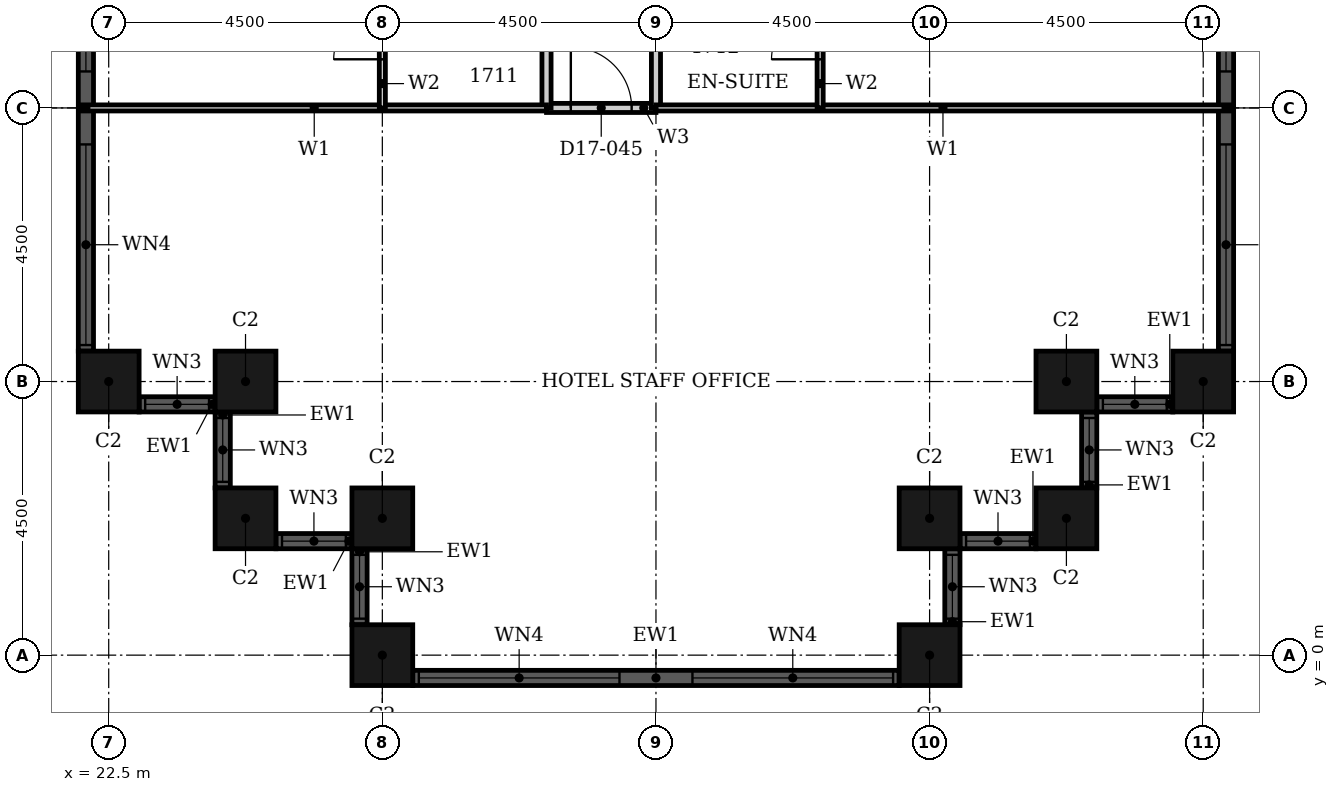
"""IFC4 building model, lengths in metres.
Left out: names, types, materials, properties, quantities, classifications, styles, units other than length and angle.
Written with IfcOpenShell. Run it as: python <this file> out.ifc"""

import sys

from ifc_helpers import new_model, si_unit, direction, frame, frame_2d, origin, origin_2d, place, context, subcontext, project, spatial, rectangle, hollow_rectangle, extrude, element, fill, save


model = new_model("IFC4")
c1 = context("Model", 3, precision=1e-05, world=origin(), true_north=direction((0.0, 1.0)))
c2 = subcontext(c1, "Body", "Model", "MODEL_VIEW")
j1 = project(units=[si_unit("LENGTHUNIT", "METRE"), si_unit("PLANEANGLEUNIT", "RADIAN")], contexts=[c1])
p1 = place(None, origin())
s1 = spatial("IfcSite", under=j1, at=p1, CompositionType="ELEMENT")
p2 = place(p1, origin())
s2 = spatial("IfcBuilding", under=s1, at=p2, CompositionType="ELEMENT")
p3 = place(p2, frame((0.0, 0.0, 74.4)))
s3 = spatial("IfcBuildingStorey", under=s2, at=p3, CompositionType="ELEMENT", Elevation=74.4)
for number, where, z_axis, x_axis in (
    (1, (22.5, 4.5, 0.0), (0.0, 0.0, 1.0), (1.0, 0.0, 0.0)),
    (2, (24.75, 4.5, 0.0), (0.0, 0.0, 1.0), (1.0, 0.0, 0.0)),
    (3, (24.75, 2.25, 0.0), (0.0, 0.0, 1.0), (1.0, 0.0, 0.0)),
    (4, (27.0, 2.25, 0.0), (0.0, 0.0, 1.0), (1.0, 0.0, 0.0)),
    (5, (27.0, 0.0, 0.0), (0.0, 0.0, 1.0), (1.0, 0.0, 0.0)),
    (6, (36.0, 0.0, 0.0), (0.0, 0.0, 1.0), (1.0, 0.0, 0.0)),
    (7, (36.0, 2.25, 0.0), (0.0, 0.0, 1.0), (1.0, 0.0, 0.0)),
    (8, (38.25, 2.25, 0.0), (0.0, 0.0, 1.0), (1.0, 0.0, 0.0)),
    (9, (38.25, 4.5, 0.0), (0.0, 0.0, 1.0), (1.0, 0.0, 0.0)),
    (10, (40.5, 4.5, 0.0), (0.0, 0.0, 1.0), (1.0, 0.0, 0.0)),
):
    element("IfcColumn", number, at=place(p3, frame(where, z_axis=z_axis, x_axis=x_axis)), inside=s3, PredefinedType="COLUMN", context=c2, shape_type="SweptSolid", body=[
        extrude(hollow_rectangle(XDim=1.0, YDim=1.0, WallThickness=0.032, at=origin_2d()), origin(), (0.0, 0.0, 1.0), 3.6),
    ])
p4 = place(p3, frame((23.0, 4.125, 0.0), z_axis=(0.0, 0.0, 1.0), x_axis=(1.0, 0.0, 0.0)))
e11 = element("IfcWall", 11, at=p4, inside=s3, PredefinedType="SOLIDWALL", context=c2, shape_type="SweptSolid", body=[
    extrude(rectangle(XDim=1.25, YDim=0.25, at=frame_2d((0.625, 0.0))), origin(), (0.0, 0.0, 1.0), 3.6),
])
p5 = place(p4, frame((0.1, 0.0, 0.9)))
e12 = element("IfcOpeningElement", 12, at=p5, cuts=e11, PredefinedType="OPENING", context=c2, shape_type="SweptSolid", body=[
    extrude(rectangle(XDim=1.05, YDim=2.08, at=frame_2d((0.525, 1.04))), frame((0.0, 0.135, 0.0), z_axis=(0.0, -1.0, 0.0), x_axis=(1.0, 0.0, 0.0)), (0.0, 0.0, 1.0), 0.27),
])
p6 = place(p3, frame((24.375, 4.0, 0.0), z_axis=(0.0, 0.0, 1.0), x_axis=(0.0, -1.0, 0.0)))
e13 = element("IfcWall", 13, at=p6, inside=s3, PredefinedType="SOLIDWALL", context=c2, shape_type="SweptSolid", body=[
    extrude(rectangle(XDim=1.25, YDim=0.25, at=frame_2d((0.625, 0.0))), origin(), (0.0, 0.0, 1.0), 3.6),
])
p7 = place(p6, frame((0.1, 0.0, 0.9)))
e14 = element("IfcOpeningElement", 14, at=p7, cuts=e13, PredefinedType="OPENING", context=c2, shape_type="SweptSolid", body=[
    extrude(rectangle(XDim=1.05, YDim=2.08, at=frame_2d((0.525, 1.04))), frame((0.0, 0.135, 0.0), z_axis=(0.0, -1.0, 0.0), x_axis=(1.0, 0.0, 0.0)), (0.0, 0.0, 1.0), 0.27),
])
p8 = place(p3, frame((25.25, 1.875, 0.0), z_axis=(0.0, 0.0, 1.0), x_axis=(1.0, 0.0, 0.0)))
e15 = element("IfcWall", 15, at=p8, inside=s3, PredefinedType="SOLIDWALL", context=c2, shape_type="SweptSolid", body=[
    extrude(rectangle(XDim=1.25, YDim=0.25, at=frame_2d((0.625, 0.0))), origin(), (0.0, 0.0, 1.0), 3.6),
])
p9 = place(p8, frame((0.1, 0.0, 0.9)))
e16 = element("IfcOpeningElement", 16, at=p9, cuts=e15, PredefinedType="OPENING", context=c2, shape_type="SweptSolid", body=[
    extrude(rectangle(XDim=1.05, YDim=2.08, at=frame_2d((0.525, 1.04))), frame((0.0, 0.135, 0.0), z_axis=(0.0, -1.0, 0.0), x_axis=(1.0, 0.0, 0.0)), (0.0, 0.0, 1.0), 0.27),
])
p10 = place(p3, frame((26.625, 1.75, 0.0), z_axis=(0.0, 0.0, 1.0), x_axis=(0.0, -1.0, 0.0)))
e17 = element("IfcWall", 17, at=p10, inside=s3, PredefinedType="SOLIDWALL", context=c2, shape_type="SweptSolid", body=[
    extrude(rectangle(XDim=1.25, YDim=0.25, at=frame_2d((0.625, 0.0))), origin(), (0.0, 0.0, 1.0), 3.6),
])
p11 = place(p10, frame((0.1, 0.0, 0.9)))
e18 = element("IfcOpeningElement", 18, at=p11, cuts=e17, PredefinedType="OPENING", context=c2, shape_type="SweptSolid", body=[
    extrude(rectangle(XDim=1.05, YDim=2.08, at=frame_2d((0.525, 1.04))), frame((0.0, 0.135, 0.0), z_axis=(0.0, -1.0, 0.0), x_axis=(1.0, 0.0, 0.0)), (0.0, 0.0, 1.0), 0.27),
])
p12 = place(p3, frame((27.5, -0.375, 0.0), z_axis=(0.0, 0.0, 1.0), x_axis=(1.0, 0.0, 0.0)))
e19 = element("IfcWall", 19, at=p12, inside=s3, PredefinedType="SOLIDWALL", context=c2, shape_type="SweptSolid", body=[
    extrude(rectangle(XDim=8.0, YDim=0.25, at=frame_2d((4.0, 0.0))), origin(), (0.0, 0.0, 1.0), 3.6),
])
p13 = place(p12, frame((0.1, 0.0, 0.9)))
e20 = element("IfcOpeningElement", 20, at=p13, cuts=e19, PredefinedType="OPENING", context=c2, shape_type="SweptSolid", body=[
    extrude(rectangle(XDim=3.3, YDim=2.08, at=frame_2d((1.65, 1.04))), frame((0.0, 0.135, 0.0), z_axis=(0.0, -1.0, 0.0), x_axis=(1.0, 0.0, 0.0)), (0.0, 0.0, 1.0), 0.27),
])
p14 = place(p12, frame((4.6, 0.0, 0.9)))
e21 = element("IfcOpeningElement", 21, at=p14, cuts=e19, PredefinedType="OPENING", context=c2, shape_type="SweptSolid", body=[
    extrude(rectangle(XDim=3.3, YDim=2.08, at=frame_2d((1.65, 1.04))), frame((0.0, 0.135, 0.0), z_axis=(0.0, -1.0, 0.0), x_axis=(1.0, 0.0, 0.0)), (0.0, 0.0, 1.0), 0.27),
])
p15 = place(p3, frame((36.375, 0.5, 0.0), z_axis=(0.0, 0.0, 1.0), x_axis=(0.0, 1.0, 0.0)))
e22 = element("IfcWall", 22, at=p15, inside=s3, PredefinedType="SOLIDWALL", context=c2, shape_type="SweptSolid", body=[
    extrude(rectangle(XDim=1.25, YDim=0.25, at=frame_2d((0.625, 0.0))), origin(), (0.0, 0.0, 1.0), 3.6),
])
p16 = place(p15, frame((0.1, 0.0, 0.9)))
e23 = element("IfcOpeningElement", 23, at=p16, cuts=e22, PredefinedType="OPENING", context=c2, shape_type="SweptSolid", body=[
    extrude(rectangle(XDim=1.05, YDim=2.08, at=frame_2d((0.525, 1.04))), frame((0.0, 0.135, 0.0), z_axis=(0.0, -1.0, 0.0), x_axis=(1.0, 0.0, 0.0)), (0.0, 0.0, 1.0), 0.27),
])
p17 = place(p3, frame((36.5, 1.875, 0.0), z_axis=(0.0, 0.0, 1.0), x_axis=(1.0, 0.0, 0.0)))
e24 = element("IfcWall", 24, at=p17, inside=s3, PredefinedType="SOLIDWALL", context=c2, shape_type="SweptSolid", body=[
    extrude(rectangle(XDim=1.25, YDim=0.25, at=frame_2d((0.625, 0.0))), origin(), (0.0, 0.0, 1.0), 3.6),
])
p18 = place(p17, frame((0.1, 0.0, 0.9)))
e25 = element("IfcOpeningElement", 25, at=p18, cuts=e24, PredefinedType="OPENING", context=c2, shape_type="SweptSolid", body=[
    extrude(rectangle(XDim=1.05, YDim=2.08, at=frame_2d((0.525, 1.04))), frame((0.0, 0.135, 0.0), z_axis=(0.0, -1.0, 0.0), x_axis=(1.0, 0.0, 0.0)), (0.0, 0.0, 1.0), 0.27),
])
p19 = place(p3, frame((38.625, 2.75, 0.0), z_axis=(0.0, 0.0, 1.0), x_axis=(0.0, 1.0, 0.0)))
e26 = element("IfcWall", 26, at=p19, inside=s3, PredefinedType="SOLIDWALL", context=c2, shape_type="SweptSolid", body=[
    extrude(rectangle(XDim=1.25, YDim=0.25, at=frame_2d((0.625, 0.0))), origin(), (0.0, 0.0, 1.0), 3.6),
])
p20 = place(p19, frame((0.1, 0.0, 0.9)))
e27 = element("IfcOpeningElement", 27, at=p20, cuts=e26, PredefinedType="OPENING", context=c2, shape_type="SweptSolid", body=[
    extrude(rectangle(XDim=1.05, YDim=2.08, at=frame_2d((0.525, 1.04))), frame((0.0, 0.135, 0.0), z_axis=(0.0, -1.0, 0.0), x_axis=(1.0, 0.0, 0.0)), (0.0, 0.0, 1.0), 0.27),
])
p21 = place(p3, frame((38.75, 4.125, 0.0), z_axis=(0.0, 0.0, 1.0), x_axis=(1.0, 0.0, 0.0)))
e28 = element("IfcWall", 28, at=p21, inside=s3, PredefinedType="SOLIDWALL", context=c2, shape_type="SweptSolid", body=[
    extrude(rectangle(XDim=1.25, YDim=0.25, at=frame_2d((0.625, 0.0))), origin(), (0.0, 0.0, 1.0), 3.6),
])
p22 = place(p21, frame((0.1, 0.0, 0.9)))
e29 = element("IfcOpeningElement", 29, at=p22, cuts=e28, PredefinedType="OPENING", context=c2, shape_type="SweptSolid", body=[
    extrude(rectangle(XDim=1.05, YDim=2.08, at=frame_2d((0.525, 1.04))), frame((0.0, 0.135, 0.0), z_axis=(0.0, -1.0, 0.0), x_axis=(1.0, 0.0, 0.0)), (0.0, 0.0, 1.0), 0.27),
])
p23 = place(p3, frame((40.875, 5.0, 0.0), z_axis=(0.0, 0.0, 1.0), x_axis=(0.0, 1.0, 0.0)))
e30 = element("IfcWall", 30, at=p23, inside=s3, PredefinedType="SOLIDWALL", context=c2, shape_type="SweptSolid", body=[
    extrude(rectangle(XDim=8.0, YDim=0.25, at=frame_2d((4.0, 0.0))), origin(), (0.0, 0.0, 1.0), 3.6),
])
p24 = place(p23, frame((0.1, 0.0, 0.9)))
e31 = element("IfcOpeningElement", 31, at=p24, cuts=e30, PredefinedType="OPENING", context=c2, shape_type="SweptSolid", body=[
    extrude(rectangle(XDim=3.3, YDim=2.08, at=frame_2d((1.65, 1.04))), frame((0.0, 0.135, 0.0), z_axis=(0.0, -1.0, 0.0), x_axis=(1.0, 0.0, 0.0)), (0.0, 0.0, 1.0), 0.27),
])
p25 = place(p23, frame((4.6, 0.0, 0.9)))
e32 = element("IfcOpeningElement", 32, at=p25, cuts=e30, PredefinedType="OPENING", context=c2, shape_type="SweptSolid", body=[
    extrude(rectangle(XDim=3.3, YDim=2.08, at=frame_2d((1.65, 1.04))), frame((0.0, 0.135, 0.0), z_axis=(0.0, -1.0, 0.0), x_axis=(1.0, 0.0, 0.0)), (0.0, 0.0, 1.0), 0.27),
])
p26 = place(p3, frame((22.125, 13.0, 0.0), z_axis=(0.0, 0.0, 1.0), x_axis=(0.0, -1.0, 0.0)))
e33 = element("IfcWall", 33, at=p26, inside=s3, PredefinedType="SOLIDWALL", context=c2, shape_type="SweptSolid", body=[
    extrude(rectangle(XDim=8.0, YDim=0.25, at=frame_2d((4.0, 0.0))), origin(), (0.0, 0.0, 1.0), 3.6),
])
p27 = place(p26, frame((0.1, 0.0, 0.9)))
e34 = element("IfcOpeningElement", 34, at=p27, cuts=e33, PredefinedType="OPENING", context=c2, shape_type="SweptSolid", body=[
    extrude(rectangle(XDim=3.3, YDim=2.08, at=frame_2d((1.65, 1.04))), frame((0.0, 0.135, 0.0), z_axis=(0.0, -1.0, 0.0), x_axis=(1.0, 0.0, 0.0)), (0.0, 0.0, 1.0), 0.27),
])
p28 = place(p26, frame((4.6, 0.0, 0.9)))
e35 = element("IfcOpeningElement", 35, at=p28, cuts=e33, PredefinedType="OPENING", context=c2, shape_type="SweptSolid", body=[
    extrude(rectangle(XDim=3.3, YDim=2.08, at=frame_2d((1.65, 1.04))), frame((0.0, 0.135, 0.0), z_axis=(0.0, -1.0, 0.0), x_axis=(1.0, 0.0, 0.0)), (0.0, 0.0, 1.0), 0.27),
])
p29 = place(p3, frame((29.7, 9.0, 0.0), z_axis=(0.0, 0.0, 1.0), x_axis=(1.0, 0.0, 0.0)))
e36 = element("IfcWall", 36, at=p29, inside=s3, PredefinedType="PARTITIONING", context=c2, shape_type="SweptSolid", body=[
    extrude(rectangle(XDim=1.8, YDim=0.15, at=frame_2d((0.9, 0.0))), origin(), (0.0, 0.0, 1.0), 3.3),
])
p30 = place(p29, frame((0.4, 0.0, 0.0)))
e37 = element("IfcOpeningElement", 37, at=p30, cuts=e36, PredefinedType="OPENING", context=c2, shape_type="SweptSolid", body=[
    extrude(rectangle(XDim=1.0, YDim=2.1, at=frame_2d((0.5, 1.05))), frame((0.0, 0.085, 0.0), z_axis=(0.0, -1.0, 0.0), x_axis=(1.0, 0.0, 0.0)), (0.0, 0.0, 1.0), 0.17),
])
p31 = place(p3, frame((29.7, 9.0, 0.0), z_axis=(0.0, 0.0, 1.0), x_axis=(0.0, 1.0, 0.0)))
e38 = element("IfcWall", 38, at=p31, inside=s3, PredefinedType="PARTITIONING", context=c2, shape_type="SweptSolid", body=[
    extrude(rectangle(XDim=11.7, YDim=0.15, at=frame_2d((5.85, 0.0))), origin(), (0.0, 0.0, 1.0), 3.3),
])
p32 = place(p31, frame((2.95, 0.0, 0.0)))
e39 = element("IfcOpeningElement", 39, at=p32, cuts=e38, PredefinedType="OPENING", context=c2, shape_type="SweptSolid", body=[
    extrude(rectangle(XDim=1.0, YDim=2.1, at=frame_2d((0.5, 1.05))), frame((0.0, 0.085, 0.0), z_axis=(0.0, -1.0, 0.0), x_axis=(1.0, 0.0, 0.0)), (0.0, 0.0, 1.0), 0.17),
])
p33 = place(p3, frame((31.5, 9.0, 0.0), z_axis=(0.0, 0.0, 1.0), x_axis=(0.0, 1.0, 0.0)))
e40 = element("IfcWall", 40, at=p33, inside=s3, PredefinedType="PARTITIONING", context=c2, shape_type="SweptSolid", body=[
    extrude(rectangle(XDim=11.7, YDim=0.15, at=frame_2d((5.85, 0.0))), origin(), (0.0, 0.0, 1.0), 2.58),
])
p34 = place(p33, frame((2.95, 0.0, 0.0)))
e41 = element("IfcOpeningElement", 41, at=p34, cuts=e40, PredefinedType="OPENING", context=c2, shape_type="SweptSolid", body=[
    extrude(rectangle(XDim=1.0, YDim=2.1, at=frame_2d((0.5, 1.05))), frame((0.0, 0.085, 0.0), z_axis=(0.0, -1.0, 0.0), x_axis=(1.0, 0.0, 0.0)), (0.0, 0.0, 1.0), 0.17),
])
p35 = place(p3, frame((31.5, 9.0, 0.0), z_axis=(0.0, 0.0, 1.0), x_axis=(1.0, 0.0, 0.0)))
e42 = element("IfcWall", 42, at=p35, inside=s3, PredefinedType="PARTITIONING", context=c2, shape_type="SweptSolid", body=[
    extrude(rectangle(XDim=9.44, YDim=0.1, at=frame_2d((4.72, 0.0))), origin(), (0.0, 0.0, 1.0), 3.3),
])
p36 = place(p3, frame((22.06, 9.0, 0.0), z_axis=(0.0, 0.0, 1.0), x_axis=(1.0, 0.0, 0.0)))
e43 = element("IfcWall", 43, at=p36, inside=s3, PredefinedType="PARTITIONING", context=c2, shape_type="SweptSolid", body=[
    extrude(rectangle(XDim=7.64, YDim=0.1, at=frame_2d((3.82, 0.0))), origin(), (0.0, 0.0, 1.0), 3.3),
])
p37 = place(p3, frame((27.0, 9.0, 0.0), z_axis=(0.0, 0.0, 1.0), x_axis=(0.0, 1.0, 0.0)))
e44 = element("IfcWall", 44, at=p37, inside=s3, PredefinedType="PARTITIONING", context=c2, shape_type="SweptSolid", body=[
    extrude(rectangle(XDim=2.4, YDim=0.1, at=frame_2d((1.2, 0.0))), origin(), (0.0, 0.0, 1.0), 2.58),
])
p38 = place(p37, frame((0.8, 0.0, 0.0)))
e45 = element("IfcOpeningElement", 45, at=p38, cuts=e44, PredefinedType="OPENING", context=c2, shape_type="SweptSolid", body=[
    extrude(rectangle(XDim=0.8, YDim=2.1, at=frame_2d((0.4, 1.05))), frame((0.0, 0.06, 0.0), z_axis=(0.0, -1.0, 0.0), x_axis=(1.0, 0.0, 0.0)), (0.0, 0.0, 1.0), 0.12),
])
p39 = place(p3, frame((34.2, 9.0, 0.0), z_axis=(0.0, 0.0, 1.0), x_axis=(0.0, 1.0, 0.0)))
e46 = element("IfcWall", 46, at=p39, inside=s3, PredefinedType="PARTITIONING", context=c2, shape_type="SweptSolid", body=[
    extrude(rectangle(XDim=2.4, YDim=0.1, at=frame_2d((1.2, 0.0))), origin(), (0.0, 0.0, 1.0), 3.3),
])
p40 = place(p39, frame((0.8, 0.0, 0.0)))
e47 = element("IfcOpeningElement", 47, at=p40, cuts=e46, PredefinedType="OPENING", context=c2, shape_type="SweptSolid", body=[
    extrude(rectangle(XDim=0.8, YDim=2.1, at=frame_2d((0.4, 1.05))), frame((0.0, 0.06, 0.0), z_axis=(0.0, -1.0, 0.0), x_axis=(1.0, 0.0, 0.0)), (0.0, 0.0, 1.0), 0.12),
])
p41 = place(p5, origin())
e48 = element("IfcWindow", 48, at=p41, inside=s3, PartitioningType="SINGLE_PANEL", PredefinedType="WINDOW", context=c2, shape_type="SweptSolid", body=[
    extrude(rectangle(XDim=1.05, YDim=2.08, at=frame_2d((0.525, 1.04))), frame((0.0, 0.03, 0.0), z_axis=(0.0, -1.0, 0.0), x_axis=(1.0, 0.0, 0.0)), (0.0, 0.0, 1.0), 0.06),
])
fill(e12, e48)
p42 = place(p7, origin())
e49 = element("IfcWindow", 49, at=p42, inside=s3, PartitioningType="SINGLE_PANEL", PredefinedType="WINDOW", context=c2, shape_type="SweptSolid", body=[
    extrude(rectangle(XDim=1.05, YDim=2.08, at=frame_2d((0.525, 1.04))), frame((0.0, 0.03, 0.0), z_axis=(0.0, -1.0, 0.0), x_axis=(1.0, 0.0, 0.0)), (0.0, 0.0, 1.0), 0.06),
])
fill(e14, e49)
p43 = place(p9, origin())
e50 = element("IfcWindow", 50, at=p43, inside=s3, PartitioningType="SINGLE_PANEL", PredefinedType="WINDOW", context=c2, shape_type="SweptSolid", body=[
    extrude(rectangle(XDim=1.05, YDim=2.08, at=frame_2d((0.525, 1.04))), frame((0.0, 0.03, 0.0), z_axis=(0.0, -1.0, 0.0), x_axis=(1.0, 0.0, 0.0)), (0.0, 0.0, 1.0), 0.06),
])
fill(e16, e50)
p44 = place(p11, origin())
e51 = element("IfcWindow", 51, at=p44, inside=s3, PartitioningType="SINGLE_PANEL", PredefinedType="WINDOW", context=c2, shape_type="SweptSolid", body=[
    extrude(rectangle(XDim=1.05, YDim=2.08, at=frame_2d((0.525, 1.04))), frame((0.0, 0.03, 0.0), z_axis=(0.0, -1.0, 0.0), x_axis=(1.0, 0.0, 0.0)), (0.0, 0.0, 1.0), 0.06),
])
fill(e18, e51)
p45 = place(p13, origin())
e52 = element("IfcWindow", 52, at=p45, inside=s3, PartitioningType="SINGLE_PANEL", PredefinedType="WINDOW", context=c2, shape_type="SweptSolid", body=[
    extrude(rectangle(XDim=3.3, YDim=2.08, at=frame_2d((1.65, 1.04))), frame((0.0, 0.03, 0.0), z_axis=(0.0, -1.0, 0.0), x_axis=(1.0, 0.0, 0.0)), (0.0, 0.0, 1.0), 0.06),
])
fill(e20, e52)
p46 = place(p14, origin())
e53 = element("IfcWindow", 53, at=p46, inside=s3, PartitioningType="SINGLE_PANEL", PredefinedType="WINDOW", context=c2, shape_type="SweptSolid", body=[
    extrude(rectangle(XDim=3.3, YDim=2.08, at=frame_2d((1.65, 1.04))), frame((0.0, 0.03, 0.0), z_axis=(0.0, -1.0, 0.0), x_axis=(1.0, 0.0, 0.0)), (0.0, 0.0, 1.0), 0.06),
])
fill(e21, e53)
p47 = place(p16, origin())
e54 = element("IfcWindow", 54, at=p47, inside=s3, PartitioningType="SINGLE_PANEL", PredefinedType="WINDOW", context=c2, shape_type="SweptSolid", body=[
    extrude(rectangle(XDim=1.05, YDim=2.08, at=frame_2d((0.525, 1.04))), frame((0.0, 0.03, 0.0), z_axis=(0.0, -1.0, 0.0), x_axis=(1.0, 0.0, 0.0)), (0.0, 0.0, 1.0), 0.06),
])
fill(e23, e54)
p48 = place(p18, origin())
e55 = element("IfcWindow", 55, at=p48, inside=s3, PartitioningType="SINGLE_PANEL", PredefinedType="WINDOW", context=c2, shape_type="SweptSolid", body=[
    extrude(rectangle(XDim=1.05, YDim=2.08, at=frame_2d((0.525, 1.04))), frame((0.0, 0.03, 0.0), z_axis=(0.0, -1.0, 0.0), x_axis=(1.0, 0.0, 0.0)), (0.0, 0.0, 1.0), 0.06),
])
fill(e25, e55)
p49 = place(p20, origin())
e56 = element("IfcWindow", 56, at=p49, inside=s3, PartitioningType="SINGLE_PANEL", PredefinedType="WINDOW", context=c2, shape_type="SweptSolid", body=[
    extrude(rectangle(XDim=1.05, YDim=2.08, at=frame_2d((0.525, 1.04))), frame((0.0, 0.03, 0.0), z_axis=(0.0, -1.0, 0.0), x_axis=(1.0, 0.0, 0.0)), (0.0, 0.0, 1.0), 0.06),
])
fill(e27, e56)
p50 = place(p22, origin())
e57 = element("IfcWindow", 57, at=p50, inside=s3, PartitioningType="SINGLE_PANEL", PredefinedType="WINDOW", context=c2, shape_type="SweptSolid", body=[
    extrude(rectangle(XDim=1.05, YDim=2.08, at=frame_2d((0.525, 1.04))), frame((0.0, 0.03, 0.0), z_axis=(0.0, -1.0, 0.0), x_axis=(1.0, 0.0, 0.0)), (0.0, 0.0, 1.0), 0.06),
])
fill(e29, e57)
p51 = place(p24, origin())
e58 = element("IfcWindow", 58, at=p51, inside=s3, PartitioningType="SINGLE_PANEL", PredefinedType="WINDOW", context=c2, shape_type="SweptSolid", body=[
    extrude(rectangle(XDim=3.3, YDim=2.08, at=frame_2d((1.65, 1.04))), frame((0.0, 0.03, 0.0), z_axis=(0.0, -1.0, 0.0), x_axis=(1.0, 0.0, 0.0)), (0.0, 0.0, 1.0), 0.06),
])
fill(e31, e58)
p52 = place(p25, origin())
e59 = element("IfcWindow", 59, at=p52, inside=s3, PartitioningType="SINGLE_PANEL", PredefinedType="WINDOW", context=c2, shape_type="SweptSolid", body=[
    extrude(rectangle(XDim=3.3, YDim=2.08, at=frame_2d((1.65, 1.04))), frame((0.0, 0.03, 0.0), z_axis=(0.0, -1.0, 0.0), x_axis=(1.0, 0.0, 0.0)), (0.0, 0.0, 1.0), 0.06),
])
fill(e32, e59)
p53 = place(p27, origin())
e60 = element("IfcWindow", 60, at=p53, inside=s3, PartitioningType="SINGLE_PANEL", PredefinedType="WINDOW", context=c2, shape_type="SweptSolid", body=[
    extrude(rectangle(XDim=3.3, YDim=2.08, at=frame_2d((1.65, 1.04))), frame((0.0, 0.03, 0.0), z_axis=(0.0, -1.0, 0.0), x_axis=(1.0, 0.0, 0.0)), (0.0, 0.0, 1.0), 0.06),
])
fill(e34, e60)
p54 = place(p28, origin())
e61 = element("IfcWindow", 61, at=p54, inside=s3, PartitioningType="SINGLE_PANEL", PredefinedType="WINDOW", context=c2, shape_type="SweptSolid", body=[
    extrude(rectangle(XDim=3.3, YDim=2.08, at=frame_2d((1.65, 1.04))), frame((0.0, 0.03, 0.0), z_axis=(0.0, -1.0, 0.0), x_axis=(1.0, 0.0, 0.0)), (0.0, 0.0, 1.0), 0.06),
])
fill(e35, e61)
p55 = place(p38, origin())
e62 = element("IfcDoor", 62, at=p55, inside=s3, OperationType="SINGLE_SWING_RIGHT", PredefinedType="DOOR", context=c2, shape_type="SweptSolid", body=[
    extrude(rectangle(XDim=0.8, YDim=2.1, at=frame_2d((0.4, 1.05))), frame((0.0, 0.025, 0.0), z_axis=(0.0, -1.0, 0.0), x_axis=(1.0, 0.0, 0.0)), (0.0, 0.0, 1.0), 0.05),
])
fill(e45, e62)
p56 = place(p40, origin())
e63 = element("IfcDoor", 63, at=p56, inside=s3, OperationType="SINGLE_SWING_LEFT", PredefinedType="DOOR", context=c2, shape_type="SweptSolid", body=[
    extrude(rectangle(XDim=0.8, YDim=2.1, at=frame_2d((0.4, 1.05))), frame((0.0, 0.025, 0.0), z_axis=(0.0, -1.0, 0.0), x_axis=(1.0, 0.0, 0.0)), (0.0, 0.0, 1.0), 0.05),
])
fill(e47, e63)
p57 = place(p30, origin())
e64 = element("IfcDoor", 64, at=p57, inside=s3, OperationType="SINGLE_SWING_LEFT", PredefinedType="DOOR", context=c2, shape_type="SweptSolid", body=[
    extrude(rectangle(XDim=1.0, YDim=2.1, at=frame_2d((0.5, 1.05))), frame((0.0, 0.025, 0.0), z_axis=(0.0, -1.0, 0.0), x_axis=(1.0, 0.0, 0.0)), (0.0, 0.0, 1.0), 0.05),
])
fill(e37, e64)
save(model, sys.argv[1])
